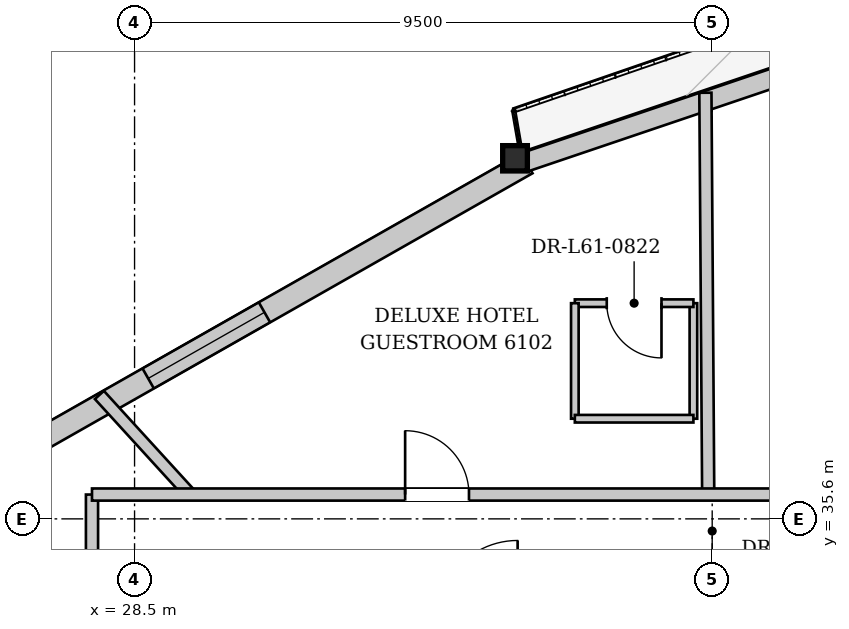
"""IFC4 building model, lengths in metres.
Left out: names, types, materials, properties, quantities, classifications, styles, units other than length and angle.
Written with IfcOpenShell. Run it as: python <this file> out.ifc"""

import sys

from ifc_helpers import new_model, si_unit, direction, frame, frame_2d, origin, origin_2d, place, context, subcontext, project, spatial, rectangle, i_section, extrude, source, transform, mapped, element, fill, save


model = new_model("IFC4")
c1 = context("Model", 3, precision=1e-05, world=origin(), true_north=direction((0.0, 1.0)))
c2 = subcontext(c1, "Body", "Model", "MODEL_VIEW")
j1 = project(units=[si_unit("LENGTHUNIT", "METRE"), si_unit("PLANEANGLEUNIT", "RADIAN")], contexts=[c1])
p1 = place(None, origin())
s1 = spatial("IfcSite", under=j1, at=p1, CompositionType="ELEMENT")
p2 = place(p1, origin())
s2 = spatial("IfcBuilding", under=s1, at=p2, CompositionType="ELEMENT")
p3 = place(p2, frame((0.0, 0.0, 230.9)))
s3 = spatial("IfcBuildingStorey", under=s2, at=p3, CompositionType="ELEMENT", Elevation=230.9)
m1 = source(origin(), c2, "Body", "SweptSolid", [
    extrude(i_section(OverallWidth=0.406, OverallDepth=0.416, WebThickness=0.027, FlangeThickness=0.042, at=origin_2d()), origin(), (0.0, 0.0, 1.0), 3.445),
])
p4 = place(p3, frame((34.857, 41.614, 0.0), z_axis=(-0.058182533366, -0.048827972581, 0.997111138191), x_axis=(0.642841922704, -0.765998865805, 0.0)))
e1 = element("IfcColumn", 1, at=p4, inside=s3, PredefinedType="COLUMN", context=c2, shape_type="MappedRepresentation", body=[
    mapped(m1, transform((0.0, 0.0, 0.0), x_axis=(1.0, 0.0, 0.0), y_axis=(0.0, 1.0, 0.0), z_axis=(0.0, 0.0, 1.0), scale=1.0)),
])
p5 = place(p3, frame((15.504, 30.396, 0.0), z_axis=(0.0, 0.0, 1.0), x_axis=(0.869398698509, 0.494111225365, 0.0)))
e2 = element("IfcWall", 2, at=p5, inside=s3, PredefinedType="SOLIDWALL", context=c2, shape_type="SweptSolid", body=[
    extrude(rectangle(XDim=22.369, YDim=0.38, at=frame_2d((11.185, 0.0))), origin(), (0.0, 0.0, 1.0), 2.872),
])
p6 = place(p5, frame((5.163, 0.0, 0.502)))
e3 = element("IfcOpeningElement", 3, at=p6, cuts=e2, PredefinedType="OPENING", context=c2, shape_type="SweptSolid", body=[
    extrude(rectangle(XDim=2.2, YDim=2.25, at=frame_2d((1.1, 1.125))), frame((0.0, 0.2, 0.0), z_axis=(0.0, -1.0, 0.0), x_axis=(1.0, 0.0, 0.0)), (0.0, 0.0, 1.0), 0.4),
])
p7 = place(p5, frame((15.206, 0.0, 0.502)))
e4 = element("IfcOpeningElement", 4, at=p7, cuts=e2, PredefinedType="OPENING", context=c2, shape_type="SweptSolid", body=[
    extrude(rectangle(XDim=2.2, YDim=2.25, at=frame_2d((1.1, 1.125))), frame((0.0, 0.2, 0.0), z_axis=(0.0, -1.0, 0.0), x_axis=(1.0, 0.0, 0.0)), (0.0, 0.0, 1.0), 0.4),
])
p8 = place(p3, frame((34.909, 41.462, 0.0), z_axis=(0.0, 0.0, 1.0), x_axis=(0.947234987264, 0.320539980193, 0.0)))
e5 = element("IfcWall", 5, at=p8, inside=s3, PredefinedType="SOLIDWALL", context=c2, shape_type="SweptSolid", body=[
    extrude(rectangle(XDim=22.369, YDim=0.32, at=frame_2d((11.185, 0.0))), origin(), (0.0, 0.0, 1.0), 2.872),
])
p9 = place(p8, frame((6.408, 0.0, 0.0)))
e6 = element("IfcOpeningElement", 6, at=p9, cuts=e5, PredefinedType="OPENING", context=c2, shape_type="SweptSolid", body=[
    extrude(rectangle(XDim=1.5, YDim=2.3, at=frame_2d((0.75, 1.15))), frame((0.0, 0.17, 0.0), z_axis=(0.0, -1.0, 0.0), x_axis=(1.0, 0.0, 0.0)), (0.0, 0.0, 1.0), 0.34),
])
p10 = place(p8, frame((15.253, 0.0, 0.402)))
e7 = element("IfcOpeningElement", 7, at=p10, cuts=e5, PredefinedType="OPENING", context=c2, shape_type="SweptSolid", body=[
    extrude(rectangle(XDim=2.6, YDim=2.35, at=frame_2d((1.3, 1.175))), frame((0.0, 0.17, 0.0), z_axis=(0.0, -1.0, 0.0), x_axis=(1.0, 0.0, 0.0)), (0.0, 0.0, 1.0), 0.34),
])
p11 = place(p3, frame((37.934, 36.0, 0.0), z_axis=(0.0, 0.0, 1.0), x_axis=(-0.006982760372, 0.999975620232, 0.0)))
e8 = element("IfcWall", 8, at=p11, inside=s3, PredefinedType="PARTITIONING", context=c2, shape_type="SweptSolid", body=[
    extrude(rectangle(XDim=6.608, YDim=0.2, at=frame_2d((3.304, 0.0))), origin(), (0.0, 0.0, 1.0), 3.38),
])
p12 = place(p3, frame((29.417, 36.0, 0.0), z_axis=(0.0, 0.0, 1.0), x_axis=(-0.67428241759, 0.738473575241, 0.0)))
e9 = element("IfcWall", 9, at=p12, inside=s3, PredefinedType="PARTITIONING", context=c2, shape_type="SweptSolid", body=[
    extrude(rectangle(XDim=2.217, YDim=0.2, at=frame_2d((1.109, 0.0))), origin(), (0.0, 0.0, 1.0), 3.38),
])
p13 = place(p3, frame((37.691, 37.247, 0.0), z_axis=(0.0, 0.0, 1.0), x_axis=(0.0, 1.0, 0.0)))
e10 = element("IfcWall", 10, at=p13, inside=s3, PredefinedType="PARTITIONING", context=c2, shape_type="SweptSolid", body=[
    extrude(rectangle(XDim=1.9, YDim=0.125, at=frame_2d((0.95, 0.0))), origin(), (0.0, 0.0, 1.0), 3.38),
])
p14 = place(p3, frame((37.691, 39.147, 0.0), z_axis=(0.0, 0.0, 1.0), x_axis=(-1.0, 0.0, 0.0)))
e11 = element("IfcWall", 11, at=p14, inside=s3, PredefinedType="PARTITIONING", context=c2, shape_type="SweptSolid", body=[
    extrude(rectangle(XDim=1.95, YDim=0.125, at=frame_2d((0.975, 0.0))), origin(), (0.0, 0.0, 1.0), 3.065),
])
p15 = place(p14, frame((0.525, 0.0, 0.0)))
e12 = element("IfcOpeningElement", 12, at=p15, cuts=e11, PredefinedType="OPENING", context=c2, shape_type="SweptSolid", body=[
    extrude(rectangle(XDim=0.9, YDim=2.1, at=frame_2d((0.45, 1.05))), frame((0.0, 0.073, 0.0), z_axis=(0.0, -1.0, 0.0), x_axis=(1.0, 0.0, 0.0)), (0.0, 0.0, 1.0), 0.145),
])
p16 = place(p3, frame((35.741, 39.147, 0.0), z_axis=(0.0, 0.0, 1.0), x_axis=(0.0, -1.0, 0.0)))
e13 = element("IfcWall", 13, at=p16, inside=s3, PredefinedType="PARTITIONING", context=c2, shape_type="SweptSolid", body=[
    extrude(rectangle(XDim=1.9, YDim=0.125, at=frame_2d((0.95, 0.0))), origin(), (0.0, 0.0, 1.0), 2.915),
])
p17 = place(p3, frame((35.741, 37.247, 0.0), z_axis=(0.0, 0.0, 1.0), x_axis=(1.0, 0.0, 0.0)))
e14 = element("IfcWall", 14, at=p17, inside=s3, PredefinedType="PARTITIONING", context=c2, shape_type="SweptSolid", body=[
    extrude(rectangle(XDim=1.95, YDim=0.125, at=frame_2d((0.975, 0.0))), origin(), (0.0, 0.0, 1.0), 3.38),
])
p18 = place(p3, frame((27.8, 17.2, 0.0), z_axis=(0.0, 0.0, 1.0), x_axis=(0.0, 1.0, 0.0)))
e15 = element("IfcWall", 15, at=p18, inside=s3, PredefinedType="PARTITIONING", context=c2, shape_type="SweptSolid", body=[
    extrude(rectangle(XDim=18.8, YDim=0.2, at=frame_2d((9.4, 0.0))), origin(), (0.0, 0.0, 1.0), 3.38),
])
p19 = place(p18, frame((15.86, 0.0, 0.0)))
e16 = element("IfcOpeningElement", 16, at=p19, cuts=e15, PredefinedType="OPENING", context=c2, shape_type="SweptSolid", body=[
    extrude(rectangle(XDim=1.05, YDim=2.2, at=frame_2d((0.525, 1.1))), frame((0.0, 0.11, 0.0), z_axis=(0.0, -1.0, 0.0), x_axis=(1.0, 0.0, 0.0)), (0.0, 0.0, 1.0), 0.22),
])
p20 = place(p18, frame((4.436, 0.0, 0.0)))
e17 = element("IfcOpeningElement", 17, at=p20, cuts=e15, PredefinedType="OPENING", context=c2, shape_type="SweptSolid", body=[
    extrude(rectangle(XDim=1.05, YDim=2.2, at=frame_2d((0.525, 1.1))), frame((0.0, 0.11, 0.0), z_axis=(0.0, -1.0, 0.0), x_axis=(1.0, 0.0, 0.0)), (0.0, 0.0, 1.0), 0.22),
])
p21 = place(p3, frame((27.8, 36.0, 0.0), z_axis=(0.0, 0.0, 1.0), x_axis=(1.0, 0.0, 0.0)))
e18 = element("IfcWall", 18, at=p21, inside=s3, PredefinedType="PARTITIONING", context=c2, shape_type="SweptSolid", body=[
    extrude(rectangle(XDim=13.2, YDim=0.2, at=frame_2d((6.6, 0.0))), origin(), (0.0, 0.0, 1.0), 3.38),
])
p22 = place(p21, frame((11.85, 0.0, 0.0)))
e19 = element("IfcOpeningElement", 19, at=p22, cuts=e18, PredefinedType="OPENING", context=c2, shape_type="SweptSolid", body=[
    extrude(rectangle(XDim=1.05, YDim=2.2, at=frame_2d((0.525, 1.1))), frame((0.0, 0.11, 0.0), z_axis=(0.0, -1.0, 0.0), x_axis=(1.0, 0.0, 0.0)), (0.0, 0.0, 1.0), 0.22),
])
p23 = place(p21, frame((5.15, 0.0, 0.0)))
e20 = element("IfcOpeningElement", 20, at=p23, cuts=e18, PredefinedType="OPENING", context=c2, shape_type="SweptSolid", body=[
    extrude(rectangle(XDim=1.05, YDim=2.2, at=frame_2d((0.525, 1.1))), frame((0.0, 0.11, 0.0), z_axis=(0.0, -1.0, 0.0), x_axis=(1.0, 0.0, 0.0)), (0.0, 0.0, 1.0), 0.22),
])
m2 = source(origin(), c2, "Body", "SweptSolid", [
    extrude(rectangle(XDim=2.2, YDim=2.25, at=frame_2d((1.1, 1.125))), frame((0.0, 0.03, 0.0), z_axis=(0.0, -1.0, 0.0), x_axis=(1.0, 0.0, 0.0)), (0.0, 0.0, 1.0), 0.06),
])
p24 = place(p7, origin())
e21 = element("IfcWindow", 21, at=p24, inside=s3, PartitioningType="SINGLE_PANEL", PredefinedType="WINDOW", context=c2, shape_type="MappedRepresentation", body=[
    mapped(m2, transform((0.0, 0.0, 0.0), x_axis=(1.0, 0.0, 0.0), y_axis=(0.0, 1.0, 0.0), z_axis=(0.0, 0.0, 1.0), scale=1.0)),
])
fill(e4, e21)
m3 = source(origin(), c2, "Body", "SweptSolid", [
    extrude(rectangle(XDim=0.9, YDim=2.1, at=frame_2d((0.45, 1.05))), frame((0.0, 0.025, 0.0), z_axis=(0.0, -1.0, 0.0), x_axis=(1.0, 0.0, 0.0)), (0.0, 0.0, 1.0), 0.05),
])
p25 = place(p15, origin())
e22 = element("IfcDoor", 22, at=p25, inside=s3, OperationType="SINGLE_SWING_LEFT", PredefinedType="DOOR", context=c2, shape_type="MappedRepresentation", body=[
    mapped(m3, transform((0.0, 0.0, 0.0), x_axis=(1.0, 0.0, 0.0), y_axis=(0.0, 1.0, 0.0), z_axis=(0.0, 0.0, 1.0), scale=1.0)),
])
fill(e12, e22)
m4 = source(origin(), c2, "Body", "SweptSolid", [
    extrude(rectangle(XDim=1.05, YDim=2.2, at=frame_2d((0.525, 1.1))), frame((0.0, 0.025, 0.0), z_axis=(0.0, -1.0, 0.0), x_axis=(1.0, 0.0, 0.0)), (0.0, 0.0, 1.0), 0.05),
])
p26 = place(p23, origin())
e23 = element("IfcDoor", 23, at=p26, inside=s3, OperationType="SINGLE_SWING_LEFT", PredefinedType="DOOR", context=c2, shape_type="MappedRepresentation", body=[
    mapped(m4, transform((0.0, 0.0, 0.0), x_axis=(1.0, 0.0, 0.0), y_axis=(0.0, 1.0, 0.0), z_axis=(0.0, 0.0, 1.0), scale=1.0)),
])
fill(e20, e23)
save(model, sys.argv[1])
